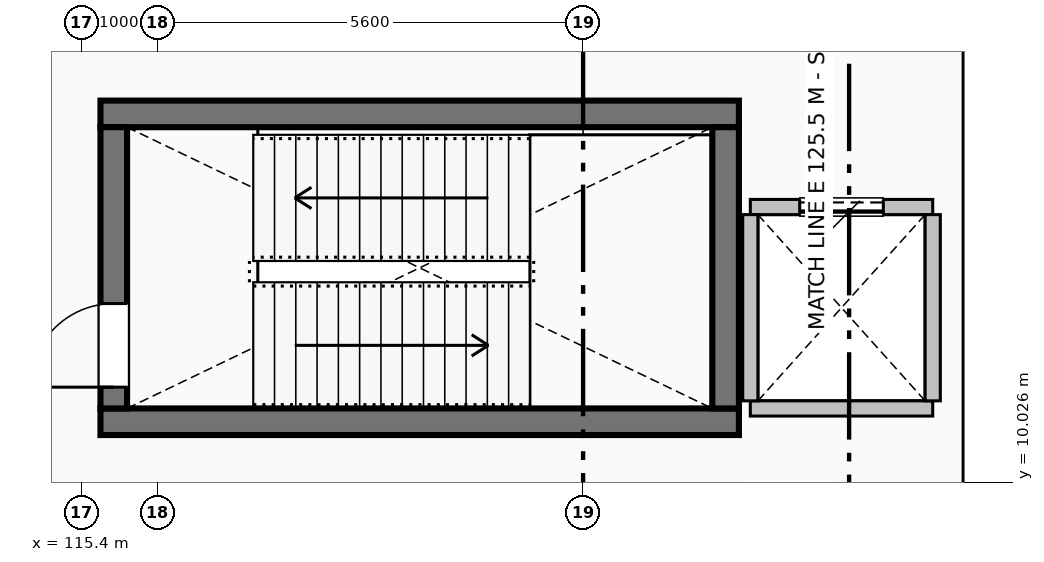
"""IFC4 building model, lengths in metres.
Left out: names, types, materials, properties, quantities, classifications, styles, units other than length and angle.
Written with IfcOpenShell. Run it as: python <this file> out.ifc"""

import sys

from ifc_helpers import new_model, si_unit, direction, frame, frame_2d, origin, place, context, subcontext, project, spatial, rectangle, extrude, element, fill, save


model = new_model("IFC4")
c1 = context("Model", 3, precision=1e-05, world=origin(), true_north=direction((0.0, 1.0)))
c2 = subcontext(c1, "Body", "Model", "MODEL_VIEW")
j1 = project(units=[si_unit("LENGTHUNIT", "METRE"), si_unit("PLANEANGLEUNIT", "RADIAN")], contexts=[c1])
p1 = place(None, origin())
s1 = spatial("IfcSite", under=j1, at=p1, CompositionType="ELEMENT")
p2 = place(p1, origin())
s2 = spatial("IfcBuilding", under=s1, at=p2, CompositionType="ELEMENT")
p3 = place(p2, frame((0.0, 0.0, -4.8)))
s3 = spatial("IfcBuildingStorey", under=s2, at=p3, CompositionType="ELEMENT", Elevation=-4.8)
for number, where, z_axis, x_axis in (
    (1, (115.65, 10.825, 0.0), (0.0, 0.0, 1.0), (1.0, 0.0, 0.0)),
    (2, (124.05, 14.875, 0.0), (0.0, 0.0, 1.0), (-1.0, 0.0, 0.0)),
):
    element("IfcWall", number, at=place(p3, frame(where, z_axis=z_axis, x_axis=x_axis)), inside=s3, PredefinedType="SHEAR", context=c2, shape_type="SweptSolid", body=[
        extrude(rectangle(XDim=8.4, YDim=0.35, at=frame_2d((4.2, 0.0))), origin(), (0.0, 0.0, 1.0), 4.5),
    ])
p4 = place(p3, frame((115.825, 11.0, 0.0), z_axis=(0.0, 0.0, 1.0), x_axis=(0.0, 1.0, 0.0)))
e3 = element("IfcWall", 3, at=p4, inside=s3, PredefinedType="SHEAR", context=c2, shape_type="SweptSolid", body=[
    extrude(rectangle(XDim=3.7, YDim=0.35, at=frame_2d((1.85, 0.0))), origin(), (0.0, 0.0, 1.0), 4.5),
])
p5 = place(p4, frame((0.28, 0.0, 0.0)))
e4 = element("IfcOpeningElement", 4, at=p5, cuts=e3, PredefinedType="OPENING", context=c2, shape_type="SweptSolid", body=[
    extrude(rectangle(XDim=1.1, YDim=2.08, at=frame_2d((0.55, 1.04))), frame((0.0, 0.185, 0.0), z_axis=(0.0, -1.0, 0.0), x_axis=(1.0, 0.0, 0.0)), (0.0, 0.0, 1.0), 0.37),
])
p6 = place(p3, frame((123.875, 14.7, 0.0), z_axis=(0.0, 0.0, 1.0), x_axis=(0.0, -1.0, 0.0)))
e5 = element("IfcWall", 5, at=p6, inside=s3, PredefinedType="SHEAR", context=c2, shape_type="SweptSolid", body=[
    extrude(rectangle(XDim=3.7, YDim=0.35, at=frame_2d((1.85, 0.0))), origin(), (0.0, 0.0, 1.0), 4.5),
])
p7 = place(p3, frame((124.2, 11.0, 0.0), z_axis=(0.0, 0.0, 1.0), x_axis=(1.0, 0.0, 0.0)))
e6 = element("IfcWall", 6, at=p7, inside=s3, PredefinedType="PARTITIONING", context=c2, shape_type="SweptSolid", body=[
    extrude(rectangle(XDim=2.4, YDim=0.2, at=frame_2d((1.2, 0.0))), origin(), (0.0, 0.0, 1.0), 4.492),
])
p8 = place(p3, frame((126.6, 13.65, 0.0), z_axis=(0.0, 0.0, 1.0), x_axis=(-1.0, 0.0, 0.0)))
e7 = element("IfcWall", 7, at=p8, inside=s3, PredefinedType="PARTITIONING", context=c2, shape_type="SweptSolid", body=[
    extrude(rectangle(XDim=2.4, YDim=0.2, at=frame_2d((1.2, 0.0))), origin(), (0.0, 0.0, 1.0), 4.492),
])
p9 = place(p8, frame((0.65, 0.0, 0.0)))
e8 = element("IfcOpeningElement", 8, at=p9, cuts=e7, PredefinedType="OPENING", context=c2, shape_type="SweptSolid", body=[
    extrude(rectangle(XDim=1.1, YDim=2.15, at=frame_2d((0.55, 1.075))), frame((0.0, 0.11, 0.0), z_axis=(0.0, -1.0, 0.0), x_axis=(1.0, 0.0, 0.0)), (0.0, 0.0, 1.0), 0.22),
])
for number, where, z_axis, x_axis in (
    (9, (124.2, 11.1, 0.0), (0.0, 0.0, 1.0), (0.0, 1.0, 0.0)),
    (10, (126.6, 13.55, 0.0), (0.0, 0.0, 1.0), (0.0, -1.0, 0.0)),
):
    element("IfcWall", number, at=place(p3, frame(where, z_axis=z_axis, x_axis=x_axis)), inside=s3, PredefinedType="PARTITIONING", context=c2, shape_type="SweptSolid", body=[
        extrude(rectangle(XDim=2.45, YDim=0.2, at=frame_2d((1.225, 0.0))), origin(), (0.0, 0.0, 1.0), 4.492),
    ])
p10 = place(p5, origin())
e11 = element("IfcDoor", 11, at=p10, inside=s3, OperationType="SINGLE_SWING_LEFT", PredefinedType="DOOR", context=c2, shape_type="SweptSolid", body=[
    extrude(rectangle(XDim=1.1, YDim=2.08, at=frame_2d((0.55, 1.04))), frame((0.0, 0.025, 0.0), z_axis=(0.0, -1.0, 0.0), x_axis=(1.0, 0.0, 0.0)), (0.0, 0.0, 1.0), 0.05),
])
fill(e4, e11)
p11 = place(p9, origin())
e12 = element("IfcDoor", 12, at=p11, inside=s3, OperationType="SLIDING_TO_LEFT", PredefinedType="DOOR", context=c2, shape_type="SweptSolid", body=[
    extrude(rectangle(XDim=1.1, YDim=2.15, at=frame_2d((0.55, 1.075))), frame((0.0, 0.025, 0.0), z_axis=(0.0, -1.0, 0.0), x_axis=(1.0, 0.0, 0.0)), (0.0, 0.0, 1.0), 0.05),
])
fill(e8, e12)
save(model, sys.argv[1])
